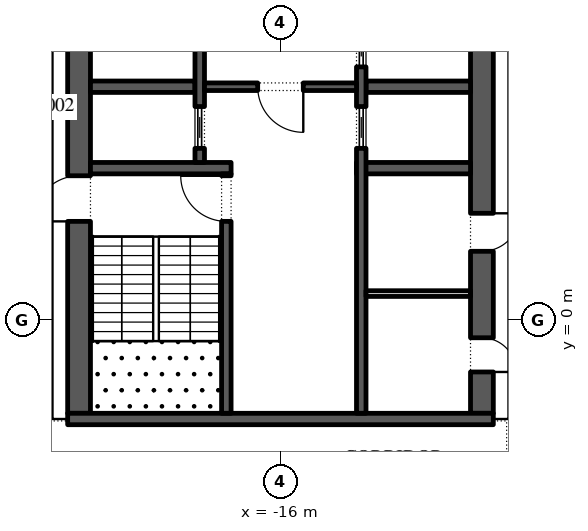
"""IFC4 building model, lengths in metres.
Left out: names, types, materials, properties, quantities, classifications, styles, units other than length and angle.
Written with IfcOpenShell. Run it as: python <this file> out.ifc"""

import sys

from ifc_helpers import new_model, si_unit, direction, frame, frame_2d, origin, place, context, subcontext, project, spatial, rectangle, extrude, element, fill, save


model = new_model("IFC4")
c1 = context("Model", 3, precision=1e-05, world=origin(), true_north=direction((0.0, 1.0)))
c2 = subcontext(c1, "Body", "Model", "MODEL_VIEW")
j1 = project(units=[si_unit("LENGTHUNIT", "METRE"), si_unit("PLANEANGLEUNIT", "RADIAN")], contexts=[c1])
p1 = place(None, origin())
s1 = spatial("IfcSite", under=j1, at=p1, CompositionType="ELEMENT")
p2 = place(p1, origin())
s2 = spatial("IfcBuilding", under=s1, at=p2, CompositionType="ELEMENT")
p3 = place(p2, frame((0.0, 0.0, 243.0)))
s3 = spatial("IfcBuildingStorey", under=s2, at=p3, CompositionType="ELEMENT", Elevation=243.0)
p4 = place(p3, frame((-21.359, 48.678, 0.0), z_axis=(0.0, 0.0, 1.0), x_axis=(-0.224949198343, -0.974370493275, 0.0)))
e1 = element("IfcWall", 1, at=p4, inside=s3, PredefinedType="STANDARD", context=c2, shape_type="SweptSolid", body=[
    extrude(rectangle(XDim=49.5, YDim=0.3, at=frame_2d((24.75, 0.0))), origin(), (0.0, 0.0, 1.0), 4.0),
])
p5 = place(p4, frame((1.157, 0.0, 0.45)))
e2 = element("IfcOpeningElement", 2, at=p5, cuts=e1, PredefinedType="OPENING", context=c2, shape_type="SweptSolid", body=[
    extrude(rectangle(XDim=4.5, YDim=3.05, at=frame_2d((2.25, 1.525))), frame((0.0, 0.16, 0.0), z_axis=(0.0, -1.0, 0.0), x_axis=(1.0, 0.0, 0.0)), (0.0, 0.0, 1.0), 0.32),
])
p6 = place(p4, frame((9.171, 0.0, 0.0)))
e3 = element("IfcOpeningElement", 3, at=p6, cuts=e1, PredefinedType="OPENING", context=c2, shape_type="SweptSolid", body=[
    extrude(rectangle(XDim=2.4, YDim=3.5, at=frame_2d((1.2, 1.75))), frame((0.0, 0.16, 0.0), z_axis=(0.0, -1.0, 0.0), x_axis=(1.0, 0.0, 0.0)), (0.0, 0.0, 1.0), 0.32),
])
p7 = place(p4, frame((15.236, 0.0, 0.45)))
e4 = element("IfcOpeningElement", 4, at=p7, cuts=e1, PredefinedType="OPENING", context=c2, shape_type="SweptSolid", body=[
    extrude(rectangle(XDim=4.5, YDim=3.05, at=frame_2d((2.25, 1.525))), frame((0.0, 0.16, 0.0), z_axis=(0.0, -1.0, 0.0), x_axis=(1.0, 0.0, 0.0)), (0.0, 0.0, 1.0), 0.32),
])
p8 = place(p4, frame((22.35, 0.0, 0.45)))
e5 = element("IfcOpeningElement", 5, at=p8, cuts=e1, PredefinedType="OPENING", context=c2, shape_type="SweptSolid", body=[
    extrude(rectangle(XDim=4.5, YDim=3.05, at=frame_2d((2.25, 1.525))), frame((0.0, 0.16, 0.0), z_axis=(0.0, -1.0, 0.0), x_axis=(1.0, 0.0, 0.0)), (0.0, 0.0, 1.0), 0.32),
])
p9 = place(p4, frame((29.464, 0.0, 0.45)))
e6 = element("IfcOpeningElement", 6, at=p9, cuts=e1, PredefinedType="OPENING", context=c2, shape_type="SweptSolid", body=[
    extrude(rectangle(XDim=4.5, YDim=3.05, at=frame_2d((2.25, 1.525))), frame((0.0, 0.16, 0.0), z_axis=(0.0, -1.0, 0.0), x_axis=(1.0, 0.0, 0.0)), (0.0, 0.0, 1.0), 0.32),
])
p10 = place(p4, frame((37.628, 0.0, 0.0)))
e7 = element("IfcOpeningElement", 7, at=p10, cuts=e1, PredefinedType="OPENING", context=c2, shape_type="SweptSolid", body=[
    extrude(rectangle(XDim=2.4, YDim=3.325, at=frame_2d((1.2, 1.663))), frame((0.0, 0.16, 0.0), z_axis=(0.0, -1.0, 0.0), x_axis=(1.0, 0.0, 0.0)), (0.0, 0.0, 1.0), 0.32),
])
p11 = place(p4, frame((43.693, 0.0, 0.45)))
e8 = element("IfcOpeningElement", 8, at=p11, cuts=e1, PredefinedType="OPENING", context=c2, shape_type="SweptSolid", body=[
    extrude(rectangle(XDim=4.5, YDim=2.825, at=frame_2d((2.25, 1.413))), frame((0.0, 0.16, 0.0), z_axis=(0.0, -1.0, 0.0), x_axis=(1.0, 0.0, 0.0)), (0.0, 0.0, 1.0), 0.32),
])
p12 = place(p3, frame((-21.3, -2.45, 0.0), z_axis=(0.0, 0.0, 1.0), x_axis=(0.0, 1.0, 0.0)))
e9 = element("IfcWall", 9, at=p12, inside=s3, PredefinedType="SHEAR", context=c2, shape_type="SweptSolid", body=[
    extrude(rectangle(XDim=27.9, YDim=0.6, at=frame_2d((13.95, 0.0))), origin(), (0.0, 0.0, 1.0), 4.0),
])
p13 = place(p12, frame((5.05, 0.0, 0.0)))
e10 = element("IfcOpeningElement", 10, at=p13, cuts=e9, PredefinedType="OPENING", context=c2, shape_type="SweptSolid", body=[
    extrude(rectangle(XDim=1.2, YDim=2.1, at=frame_2d((0.6, 1.05))), frame((0.0, 0.31, 0.0), z_axis=(0.0, -1.0, 0.0), x_axis=(1.0, 0.0, 0.0)), (0.0, 0.0, 1.0), 0.62),
])
p14 = place(p12, frame((21.65, 0.0, 0.0)))
e11 = element("IfcOpeningElement", 11, at=p14, cuts=e9, PredefinedType="OPENING", context=c2, shape_type="SweptSolid", body=[
    extrude(rectangle(XDim=1.2, YDim=2.1, at=frame_2d((0.6, 1.05))), frame((0.0, 0.31, 0.0), z_axis=(0.0, -1.0, 0.0), x_axis=(1.0, 0.0, 0.0)), (0.0, 0.0, 1.0), 0.62),
])
p15 = place(p3, frame((-10.7, -2.45, 0.0), z_axis=(0.0, 0.0, 1.0), x_axis=(0.0, 1.0, 0.0)))
e12 = element("IfcWall", 12, at=p15, inside=s3, PredefinedType="SHEAR", context=c2, shape_type="SweptSolid", body=[
    extrude(rectangle(XDim=27.9, YDim=0.6, at=frame_2d((13.95, 0.0))), origin(), (0.0, 0.0, 1.0), 4.0),
])
p16 = place(p15, frame((23.65, 0.0, 0.0)))
e13 = element("IfcOpeningElement", 13, at=p16, cuts=e12, PredefinedType="OPENING", context=c2, shape_type="SweptSolid", body=[
    extrude(rectangle(XDim=2.4, YDim=2.1, at=frame_2d((1.2, 1.05))), frame((0.0, 0.31, 0.0), z_axis=(0.0, -1.0, 0.0), x_axis=(1.0, 0.0, 0.0)), (0.0, 0.0, 1.0), 0.62),
])
p17 = place(p15, frame((1.087, 0.0, 0.0)))
e14 = element("IfcOpeningElement", 14, at=p17, cuts=e12, PredefinedType="OPENING", context=c2, shape_type="SweptSolid", body=[
    extrude(rectangle(XDim=0.9, YDim=2.1, at=frame_2d((0.45, 1.05))), frame((0.0, 0.31, 0.0), z_axis=(0.0, -1.0, 0.0), x_axis=(1.0, 0.0, 0.0)), (0.0, 0.0, 1.0), 0.62),
])
p18 = place(p15, frame((4.262, 0.0, 0.0)))
e15 = element("IfcOpeningElement", 15, at=p18, cuts=e12, PredefinedType="OPENING", context=c2, shape_type="SweptSolid", body=[
    extrude(rectangle(XDim=1.0, YDim=2.1, at=frame_2d((0.5, 1.05))), frame((0.0, 0.31, 0.0), z_axis=(0.0, -1.0, 0.0), x_axis=(1.0, 0.0, 0.0)), (0.0, 0.0, 1.0), 0.62),
])
p19 = place(p3, frame((-21.6, -2.6, 0.0), z_axis=(0.0, 0.0, 1.0), x_axis=(1.0, 0.0, 0.0)))
e16 = element("IfcWall", 16, at=p19, inside=s3, PredefinedType="SHEAR", context=c2, shape_type="SweptSolid", body=[
    extrude(rectangle(XDim=11.2, YDim=0.3, at=frame_2d((5.6, 0.0))), origin(), (0.0, 0.0, 1.0), 4.0),
])
p20 = place(p3, frame((-21.0, 4.0, 0.0), z_axis=(0.0, 0.0, 1.0), x_axis=(1.0, 0.0, 0.0)))
e17 = element("IfcWall", 17, at=p20, inside=s3, PredefinedType="SHEAR", context=c2, shape_type="SweptSolid", body=[
    extrude(rectangle(XDim=3.7, YDim=0.3, at=frame_2d((1.85, 0.0))), origin(), (0.0, 0.0, 1.0), 4.0),
])
p21 = place(p3, frame((-17.425, -2.45, 0.0), z_axis=(0.0, 0.0, 1.0), x_axis=(0.0, 1.0, 0.0)))
e18 = element("IfcWall", 18, at=p21, inside=s3, PredefinedType="SHEAR", context=c2, shape_type="SweptSolid", body=[
    extrude(rectangle(XDim=6.3, YDim=0.25, at=frame_2d((3.15, 0.0))), origin(), (0.0, 0.0, 1.0), 4.0),
])
p22 = place(p21, frame((5.05, 0.0, 0.0)))
e19 = element("IfcOpeningElement", 19, at=p22, cuts=e18, PredefinedType="OPENING", context=c2, shape_type="SweptSolid", body=[
    extrude(rectangle(XDim=1.2, YDim=2.1, at=frame_2d((0.6, 1.05))), frame((0.0, 0.135, 0.0), z_axis=(0.0, -1.0, 0.0), x_axis=(1.0, 0.0, 0.0)), (0.0, 0.0, 1.0), 0.27),
])
p23 = place(p3, frame((-21.0, 6.143, 0.0), z_axis=(0.0, 0.0, 1.0), x_axis=(1.0, 0.0, 0.0)))
e20 = element("IfcWall", 20, at=p23, inside=s3, PredefinedType="SHEAR", context=c2, shape_type="SweptSolid", body=[
    extrude(rectangle(XDim=2.75, YDim=0.3, at=frame_2d((1.375, 0.0))), origin(), (0.0, 0.0, 1.0), 4.0),
])
p24 = place(p3, frame((-18.125, 4.15, 0.0), z_axis=(0.0, 0.0, 1.0), x_axis=(0.0, 1.0, 0.0)))
e21 = element("IfcWall", 21, at=p24, inside=s3, PredefinedType="SHEAR", context=c2, shape_type="SweptSolid", body=[
    extrude(rectangle(XDim=14.7, YDim=0.25, at=frame_2d((7.35, 0.0))), origin(), (0.0, 0.0, 1.0), 4.0),
])
p25 = place(p24, frame((3.246, 0.0, 0.0)))
e22 = element("IfcOpeningElement", 22, at=p25, cuts=e21, PredefinedType="OPENING", context=c2, shape_type="SweptSolid", body=[
    extrude(rectangle(XDim=0.9, YDim=2.1, at=frame_2d((0.45, 1.05))), frame((0.0, 0.135, 0.0), z_axis=(0.0, -1.0, 0.0), x_axis=(1.0, 0.0, 0.0)), (0.0, 0.0, 1.0), 0.27),
])
p26 = place(p24, frame((8.454, 0.0, 0.0)))
e23 = element("IfcOpeningElement", 23, at=p26, cuts=e21, PredefinedType="OPENING", context=c2, shape_type="SweptSolid", body=[
    extrude(rectangle(XDim=0.9, YDim=2.1, at=frame_2d((0.45, 1.05))), frame((0.0, 0.135, 0.0), z_axis=(0.0, -1.0, 0.0), x_axis=(1.0, 0.0, 0.0)), (0.0, 0.0, 1.0), 0.27),
])
p27 = place(p24, frame((0.371, 0.0, 0.0)))
e24 = element("IfcOpeningElement", 24, at=p27, cuts=e21, PredefinedType="OPENING", context=c2, shape_type="SweptSolid", body=[
    extrude(rectangle(XDim=1.1, YDim=2.1, at=frame_2d((0.55, 1.05))), frame((0.0, 0.135, 0.0), z_axis=(0.0, -1.0, 0.0), x_axis=(1.0, 0.0, 0.0)), (0.0, 0.0, 1.0), 0.27),
])
p28 = place(p24, frame((13.229, 0.0, 0.0)))
e25 = element("IfcOpeningElement", 25, at=p28, cuts=e21, PredefinedType="OPENING", context=c2, shape_type="SweptSolid", body=[
    extrude(rectangle(XDim=1.1, YDim=2.1, at=frame_2d((0.55, 1.05))), frame((0.0, 0.135, 0.0), z_axis=(0.0, -1.0, 0.0), x_axis=(1.0, 0.0, 0.0)), (0.0, 0.0, 1.0), 0.27),
])
p29 = place(p3, frame((-14.0, 4.0, 0.0), z_axis=(0.0, 0.0, 1.0), x_axis=(1.0, 0.0, 0.0)))
e26 = element("IfcWall", 26, at=p29, inside=s3, PredefinedType="SHEAR", context=c2, shape_type="SweptSolid", body=[
    extrude(rectangle(XDim=3.0, YDim=0.3, at=frame_2d((1.5, 0.0))), origin(), (0.0, 0.0, 1.0), 4.0),
])
p30 = place(p3, frame((-13.75, 6.143, 0.0), z_axis=(0.0, 0.0, 1.0), x_axis=(1.0, 0.0, 0.0)))
e27 = element("IfcWall", 27, at=p30, inside=s3, PredefinedType="SHEAR", context=c2, shape_type="SweptSolid", body=[
    extrude(rectangle(XDim=2.75, YDim=0.3, at=frame_2d((1.375, 0.0))), origin(), (0.0, 0.0, 1.0), 4.0),
])
p31 = place(p3, frame((-13.875, -2.45, 0.0), z_axis=(0.0, 0.0, 1.0), x_axis=(0.0, 1.0, 0.0)))
e28 = element("IfcWall", 28, at=p31, inside=s3, PredefinedType="SHEAR", context=c2, shape_type="SweptSolid", body=[
    extrude(rectangle(XDim=21.3, YDim=0.25, at=frame_2d((10.65, 0.0))), origin(), (0.0, 0.0, 1.0), 4.0),
])
p32 = place(p31, frame((16.261, 0.0, 0.0)))
e29 = element("IfcOpeningElement", 29, at=p32, cuts=e28, PredefinedType="OPENING", context=c2, shape_type="SweptSolid", body=[
    extrude(rectangle(XDim=0.9, YDim=2.1, at=frame_2d((0.45, 1.05))), frame((0.0, 0.135, 0.0), z_axis=(0.0, -1.0, 0.0), x_axis=(1.0, 0.0, 0.0)), (0.0, 0.0, 1.0), 0.27),
])
p33 = place(p31, frame((19.325, 0.0, 0.0)))
e30 = element("IfcOpeningElement", 30, at=p33, cuts=e28, PredefinedType="OPENING", context=c2, shape_type="SweptSolid", body=[
    extrude(rectangle(XDim=0.9, YDim=2.1, at=frame_2d((0.45, 1.05))), frame((0.0, 0.135, 0.0), z_axis=(0.0, -1.0, 0.0), x_axis=(1.0, 0.0, 0.0)), (0.0, 0.0, 1.0), 0.27),
])
p34 = place(p31, frame((6.971, 0.0, 0.0)))
e31 = element("IfcOpeningElement", 31, at=p34, cuts=e28, PredefinedType="OPENING", context=c2, shape_type="SweptSolid", body=[
    extrude(rectangle(XDim=1.1, YDim=2.1, at=frame_2d((0.55, 1.05))), frame((0.0, 0.135, 0.0), z_axis=(0.0, -1.0, 0.0), x_axis=(1.0, 0.0, 0.0)), (0.0, 0.0, 1.0), 0.27),
])
p35 = place(p31, frame((9.114, 0.0, 0.0)))
e32 = element("IfcOpeningElement", 32, at=p35, cuts=e28, PredefinedType="OPENING", context=c2, shape_type="SweptSolid", body=[
    extrude(rectangle(XDim=1.1, YDim=2.1, at=frame_2d((0.55, 1.05))), frame((0.0, 0.135, 0.0), z_axis=(0.0, -1.0, 0.0), x_axis=(1.0, 0.0, 0.0)), (0.0, 0.0, 1.0), 0.27),
])
p36 = place(p31, frame((11.257, 0.0, 0.0)))
e33 = element("IfcOpeningElement", 33, at=p36, cuts=e28, PredefinedType="OPENING", context=c2, shape_type="SweptSolid", body=[
    extrude(rectangle(XDim=1.1, YDim=2.1, at=frame_2d((0.55, 1.05))), frame((0.0, 0.135, 0.0), z_axis=(0.0, -1.0, 0.0), x_axis=(1.0, 0.0, 0.0)), (0.0, 0.0, 1.0), 0.27),
])
p37 = place(p31, frame((13.4, 0.0, 0.0)))
e34 = element("IfcOpeningElement", 34, at=p37, cuts=e28, PredefinedType="OPENING", context=c2, shape_type="SweptSolid", body=[
    extrude(rectangle(XDim=1.1, YDim=2.1, at=frame_2d((0.55, 1.05))), frame((0.0, 0.135, 0.0), z_axis=(0.0, -1.0, 0.0), x_axis=(1.0, 0.0, 0.0)), (0.0, 0.0, 1.0), 0.27),
])
p38 = place(p3, frame((-18.0, 6.143, 0.0), z_axis=(0.0, 0.0, 1.0), x_axis=(1.0, 0.0, 0.0)))
e35 = element("IfcWall", 35, at=p38, inside=s3, PredefinedType="SHEAR", context=c2, shape_type="SweptSolid", body=[
    extrude(rectangle(XDim=4.0, YDim=0.2, at=frame_2d((2.0, 0.0))), origin(), (0.0, 0.0, 1.0), 4.0),
])
p39 = place(p38, frame((1.4, 0.0, 0.0)))
e36 = element("IfcOpeningElement", 36, at=p39, cuts=e35, PredefinedType="OPENING", context=c2, shape_type="SweptSolid", body=[
    extrude(rectangle(XDim=1.2, YDim=2.1, at=frame_2d((0.6, 1.05))), frame((0.0, 0.11, 0.0), z_axis=(0.0, -1.0, 0.0), x_axis=(1.0, 0.0, 0.0)), (0.0, 0.0, 1.0), 0.22),
])
p40 = place(p3, frame((-13.75, 0.7, 0.0), z_axis=(0.0, 0.0, 1.0), x_axis=(1.0, 0.0, 0.0)))
e37 = element("IfcWall", 37, at=p40, inside=s3, PredefinedType="PARTITIONING", context=c2, shape_type="SweptSolid", body=[
    extrude(rectangle(XDim=2.75, YDim=0.15, at=frame_2d((1.375, 0.0))), origin(), (0.0, 0.0, 1.0), 4.0),
])
p41 = place(p27, origin())
e38 = element("IfcDoor", 38, at=p41, inside=s3, OperationType="SLIDING_TO_LEFT", PredefinedType="DOOR", context=c2, shape_type="SweptSolid", body=[
    extrude(rectangle(XDim=1.1, YDim=2.1, at=frame_2d((0.55, 1.05))), frame((0.0, 0.025, 0.0), z_axis=(0.0, -1.0, 0.0), x_axis=(1.0, 0.0, 0.0)), (0.0, 0.0, 1.0), 0.05),
])
fill(e24, e38)
p42 = place(p34, origin())
e39 = element("IfcDoor", 39, at=p42, inside=s3, OperationType="SLIDING_TO_LEFT", PredefinedType="DOOR", context=c2, shape_type="SweptSolid", body=[
    extrude(rectangle(XDim=1.1, YDim=2.1, at=frame_2d((0.55, 1.05))), frame((0.0, 0.025, 0.0), z_axis=(0.0, -1.0, 0.0), x_axis=(1.0, 0.0, 0.0)), (0.0, 0.0, 1.0), 0.05),
])
fill(e31, e39)
p43 = place(p35, origin())
e40 = element("IfcDoor", 40, at=p43, inside=s3, OperationType="SLIDING_TO_LEFT", PredefinedType="DOOR", context=c2, shape_type="SweptSolid", body=[
    extrude(rectangle(XDim=1.1, YDim=2.1, at=frame_2d((0.55, 1.05))), frame((0.0, 0.025, 0.0), z_axis=(0.0, -1.0, 0.0), x_axis=(1.0, 0.0, 0.0)), (0.0, 0.0, 1.0), 0.05),
])
fill(e32, e40)
p44 = place(p39, frame((1.2, 0.0, 0.0), z_axis=(0.0, 0.0, 1.0), x_axis=(-1.0, 0.0, 0.0)))
e41 = element("IfcDoor", 41, at=p44, inside=s3, OperationType="SINGLE_SWING_RIGHT", PredefinedType="DOOR", context=c2, shape_type="SweptSolid", body=[
    extrude(rectangle(XDim=1.2, YDim=2.1, at=frame_2d((0.6, 1.05))), frame((0.0, 0.025, 0.0), z_axis=(0.0, -1.0, 0.0), x_axis=(1.0, 0.0, 0.0)), (0.0, 0.0, 1.0), 0.05),
])
fill(e36, e41)
p45 = place(p22, origin())
e42 = element("IfcDoor", 42, at=p45, inside=s3, OperationType="SINGLE_SWING_LEFT", PredefinedType="DOOR", context=c2, shape_type="SweptSolid", body=[
    extrude(rectangle(XDim=1.2, YDim=2.1, at=frame_2d((0.6, 1.05))), frame((0.0, 0.025, 0.0), z_axis=(0.0, -1.0, 0.0), x_axis=(1.0, 0.0, 0.0)), (0.0, 0.0, 1.0), 0.05),
])
fill(e19, e42)
p46 = place(p13, origin())
e43 = element("IfcDoor", 43, at=p46, inside=s3, OperationType="SINGLE_SWING_RIGHT", PredefinedType="DOOR", context=c2, shape_type="SweptSolid", body=[
    extrude(rectangle(XDim=1.2, YDim=2.1, at=frame_2d((0.6, 1.05))), frame((0.0, 0.025, 0.0), z_axis=(0.0, -1.0, 0.0), x_axis=(1.0, 0.0, 0.0)), (0.0, 0.0, 1.0), 0.05),
])
fill(e10, e43)
p47 = place(p17, frame((0.9, 0.55, 0.0), z_axis=(0.0, 0.0, 1.0), x_axis=(-1.0, 0.0, 0.0)))
e44 = element("IfcDoor", 44, at=p47, inside=s3, OperationType="SINGLE_SWING_LEFT", PredefinedType="DOOR", context=c2, shape_type="SweptSolid", body=[
    extrude(rectangle(XDim=0.9, YDim=2.1, at=frame_2d((0.45, 1.05))), frame((0.0, 0.3, 0.0), z_axis=(0.0, -1.0, 0.0), x_axis=(1.0, 0.0, 0.0)), (0.0, 0.0, 1.0), 0.05),
])
fill(e14, e44)
p48 = place(p18, frame((1.0, 0.55, 0.0), z_axis=(0.0, 0.0, 1.0), x_axis=(-1.0, 0.0, 0.0)))
e45 = element("IfcDoor", 45, at=p48, inside=s3, OperationType="SINGLE_SWING_RIGHT", PredefinedType="DOOR", context=c2, shape_type="SweptSolid", body=[
    extrude(rectangle(XDim=1.0, YDim=2.1, at=frame_2d((0.5, 1.05))), frame((0.0, 0.3, 0.0), z_axis=(0.0, -1.0, 0.0), x_axis=(1.0, 0.0, 0.0)), (0.0, 0.0, 1.0), 0.05),
])
fill(e15, e45)
save(model, sys.argv[1])
